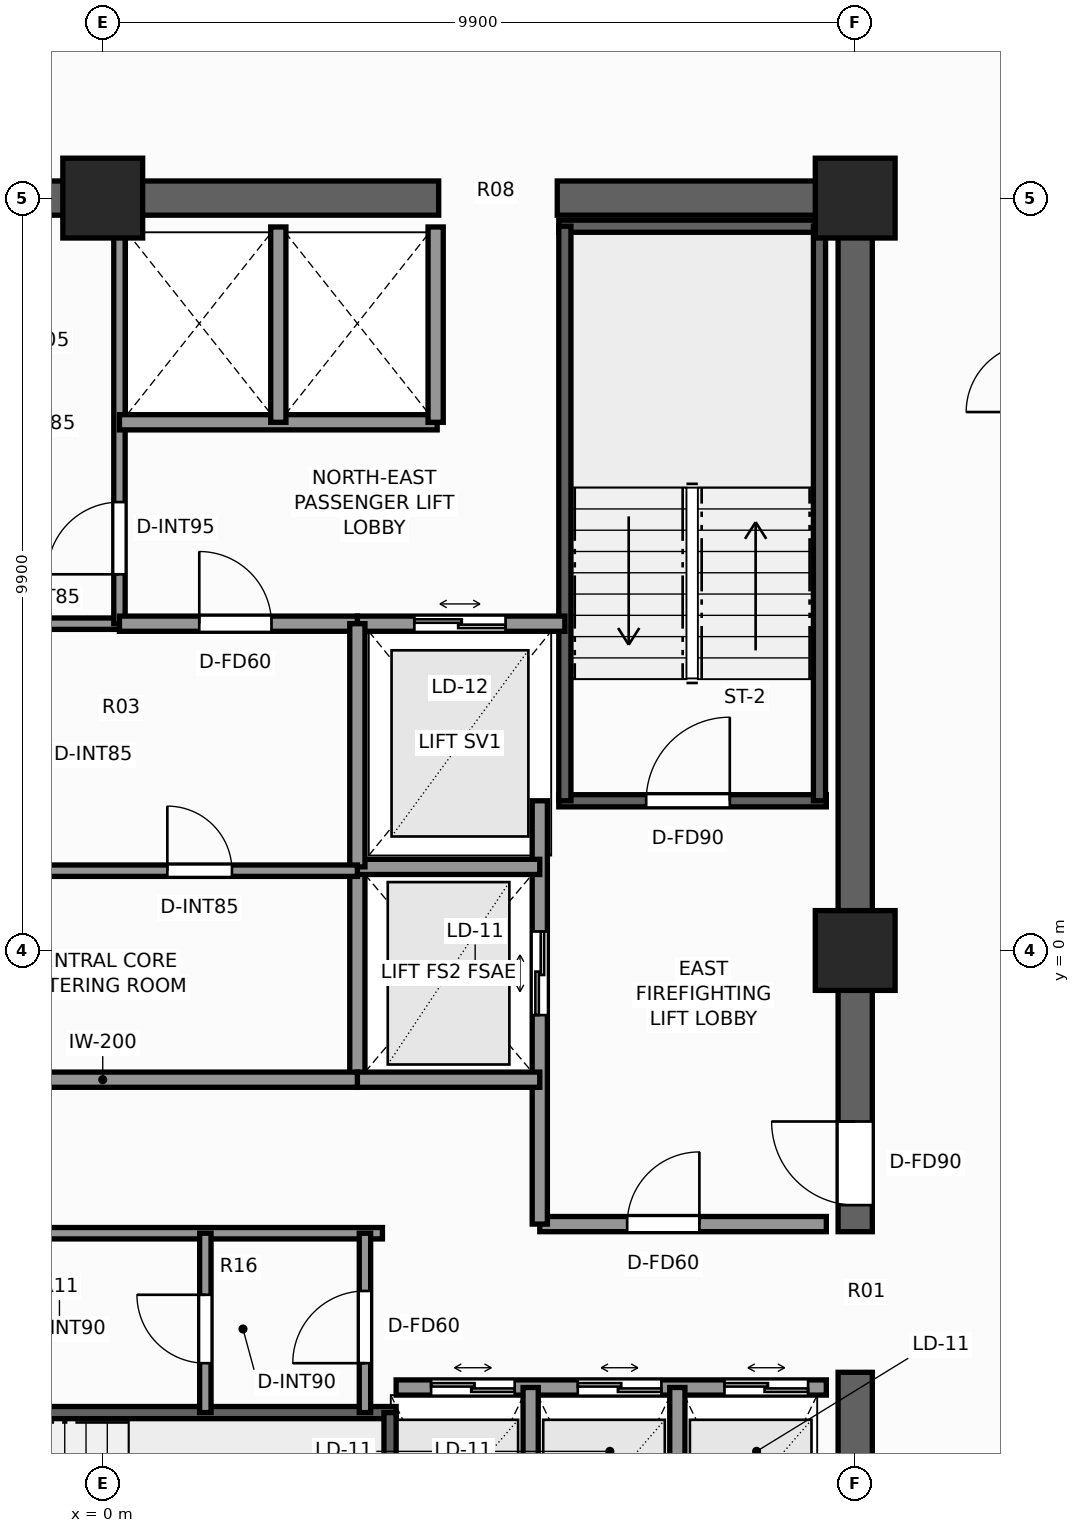
"""IFC4 building model, lengths in metres.
Left out: names, types, materials, properties, quantities, classifications, styles, units other than length and angle.
Written with IfcOpenShell. Run it as: python <this file> out.ifc"""

import sys

from ifc_helpers import new_model, si_unit, direction, frame, frame_2d, origin, origin_2d, place, context, subcontext, project, spatial, rectangle, extrude, element, fill, save


model = new_model("IFC4")
c1 = context("Model", 3, precision=1e-05, world=origin(), true_north=direction((0.0, 1.0)))
c2 = subcontext(c1, "Body", "Model", "MODEL_VIEW")
j1 = project(units=[si_unit("LENGTHUNIT", "METRE"), si_unit("PLANEANGLEUNIT", "RADIAN")], contexts=[c1])
p1 = place(None, origin())
s1 = spatial("IfcSite", under=j1, at=p1, CompositionType="ELEMENT")
p2 = place(p1, origin())
s2 = spatial("IfcBuilding", under=s1, at=p2, CompositionType="ELEMENT")
p3 = place(p2, frame((0.0, 0.0, 222.9)))
s3 = spatial("IfcBuildingStorey", under=s2, at=p3, CompositionType="ELEMENT", Elevation=222.9)
p4 = place(p3, frame((-10.125, 9.9, 0.0), z_axis=(0.0, 0.0, 1.0), x_axis=(1.0, 0.0, 0.0)))
e1 = element("IfcWall", 1, at=p4, inside=s3, PredefinedType="SHEAR", context=c2, shape_type="SweptSolid", body=[
    extrude(rectangle(XDim=14.545, YDim=0.45, at=frame_2d((7.272, 0.0))), origin(), (0.0, 0.0, 1.0), 3.3),
])
p5 = place(p3, frame((5.98, 9.9, 0.0), z_axis=(0.0, 0.0, 1.0), x_axis=(1.0, 0.0, 0.0)))
e2 = element("IfcWall", 2, at=p5, inside=s3, PredefinedType="SHEAR", context=c2, shape_type="SweptSolid", body=[
    extrude(rectangle(XDim=4.145, YDim=0.45, at=frame_2d((2.073, 0.0))), origin(), (0.0, 0.0, 1.0), 3.3),
])
p6 = place(p3, frame((9.9, -9.675, 0.0), z_axis=(0.0, 0.0, 1.0), x_axis=(0.0, 1.0, 0.0)))
e3 = element("IfcWall", 3, at=p6, inside=s3, PredefinedType="SHEAR", context=c2, shape_type="SweptSolid", body=[
    extrude(rectangle(XDim=4.125, YDim=0.45, at=frame_2d((2.062, 0.0))), origin(), (0.0, 0.0, 1.0), 3.3),
])
p7 = place(p3, frame((9.9, -3.7, 0.0), z_axis=(0.0, 0.0, 1.0), x_axis=(0.0, 1.0, 0.0)))
e4 = element("IfcWall", 4, at=p7, inside=s3, PredefinedType="SHEAR", context=c2, shape_type="SweptSolid", body=[
    extrude(rectangle(XDim=13.375, YDim=0.45, at=frame_2d((6.688, 0.0))), origin(), (0.0, 0.0, 1.0), 3.3),
])
p8 = place(p7, frame((0.35, 0.0, 0.0)))
e5 = element("IfcOpeningElement", 5, at=p8, cuts=e4, PredefinedType="OPENING", context=c2, shape_type="SweptSolid", body=[
    extrude(rectangle(XDim=1.1, YDim=2.2, at=frame_2d((0.55, 1.1))), frame((0.0, 0.235, 0.0), z_axis=(0.0, -1.0, 0.0), x_axis=(1.0, 0.0, 0.0)), (0.0, 0.0, 1.0), 0.47),
])
for number, where, z_axis, x_axis in (
    (6, (9.9, 9.9, 0.0), (0.0, 0.0, 1.0), (1.0, 0.0, 0.0)),
    (7, (9.9, 0.0, 0.0), (0.0, 0.0, 1.0), (1.0, 0.0, 0.0)),
    (8, (0.0, 9.9, 0.0), (0.0, 0.0, 1.0), (1.0, 0.0, 0.0)),
):
    element("IfcColumn", number, at=place(p3, frame(where, z_axis=z_axis, x_axis=x_axis)), inside=s3, PredefinedType="COLUMN", context=c2, shape_type="SweptSolid", body=[
        extrude(rectangle(XDim=1.05, YDim=1.05, at=origin_2d()), origin(), (0.0, 0.0, 1.0), 3.3),
    ])
p9 = place(p3, frame((6.0, 1.97, 0.0), z_axis=(0.0, 0.0, 1.0), x_axis=(1.0, 0.0, 0.0)))
e9 = element("IfcWall", 9, at=p9, inside=s3, PredefinedType="SHEAR", context=c2, shape_type="SweptSolid", body=[
    extrude(rectangle(XDim=3.52, YDim=0.16, at=frame_2d((1.76, 0.0))), origin(), (0.0, 0.0, 1.0), 3.3),
])
p10 = place(p9, frame((1.15, 0.0, 0.0)))
e10 = element("IfcOpeningElement", 10, at=p10, cuts=e9, PredefinedType="OPENING", context=c2, shape_type="SweptSolid", body=[
    extrude(rectangle(XDim=1.1, YDim=2.2, at=frame_2d((0.55, 1.1))), frame((0.0, 0.09, 0.0), z_axis=(0.0, -1.0, 0.0), x_axis=(1.0, 0.0, 0.0)), (0.0, 0.0, 1.0), 0.18),
])
p11 = place(p3, frame((6.0, 9.53, 0.0), z_axis=(0.0, 0.0, 1.0), x_axis=(1.0, 0.0, 0.0)))
e11 = element("IfcWall", 11, at=p11, inside=s3, PredefinedType="SHEAR", context=c2, shape_type="SweptSolid", body=[
    extrude(rectangle(XDim=3.52, YDim=0.16, at=frame_2d((1.76, 0.0))), origin(), (0.0, 0.0, 1.0), 3.3),
])
for number, where, z_axis, x_axis in (
    (12, (6.08, 1.97, 0.0), (0.0, 0.0, 1.0), (0.0, 1.0, 0.0)),
    (13, (9.43, 1.97, 0.0), (0.0, 0.0, 1.0), (0.0, 1.0, 0.0)),
):
    element("IfcWall", number, at=place(p3, frame(where, z_axis=z_axis, x_axis=x_axis)), inside=s3, PredefinedType="SHEAR", context=c2, shape_type="SweptSolid", body=[
        extrude(rectangle(XDim=7.56, YDim=0.16, at=frame_2d((3.78, 0.0))), origin(), (0.0, 0.0, 1.0), 3.3),
    ])
p12 = place(p3, frame((-3.86, -6.08, 0.0), z_axis=(0.0, 0.0, 1.0), x_axis=(1.0, 0.0, 0.0)))
e14 = element("IfcWall", 14, at=p12, inside=s3, PredefinedType="SHEAR", context=c2, shape_type="SweptSolid", body=[
    extrude(rectangle(XDim=7.72, YDim=0.16, at=frame_2d((3.86, 0.0))), origin(), (0.0, 0.0, 1.0), 3.3),
])
p13 = place(p3, frame((3.78, -9.43, 0.0), z_axis=(0.0, 0.0, 1.0), x_axis=(0.0, 1.0, 0.0)))
e15 = element("IfcWall", 15, at=p13, inside=s3, PredefinedType="SHEAR", context=c2, shape_type="SweptSolid", body=[
    extrude(rectangle(XDim=3.35, YDim=0.16, at=frame_2d((1.675, 0.0))), origin(), (0.0, 0.0, 1.0), 3.3),
])
p14 = place(p3, frame((5.75, -3.6, 0.0), z_axis=(0.0, 0.0, 1.0), x_axis=(1.0, 0.0, 0.0)))
e16 = element("IfcWall", 16, at=p14, inside=s3, PredefinedType="SOLIDWALL", context=c2, shape_type="SweptSolid", body=[
    extrude(rectangle(XDim=3.77, YDim=0.2, at=frame_2d((1.885, 0.0))), origin(), (0.0, 0.0, 1.0), 3.08),
])
p15 = place(p14, frame((1.15, 0.0, 0.0)))
e17 = element("IfcOpeningElement", 17, at=p15, cuts=e16, PredefinedType="OPENING", context=c2, shape_type="SweptSolid", body=[
    extrude(rectangle(XDim=0.95, YDim=2.06, at=frame_2d((0.475, 1.03))), frame((0.0, 0.11, 0.0), z_axis=(0.0, -1.0, 0.0), x_axis=(1.0, 0.0, 0.0)), (0.0, 0.0, 1.0), 0.22),
])
p16 = place(p3, frame((5.75, -3.6, 0.0), z_axis=(0.0, 0.0, 1.0), x_axis=(0.0, 1.0, 0.0)))
e18 = element("IfcWall", 18, at=p16, inside=s3, PredefinedType="SOLIDWALL", context=c2, shape_type="SweptSolid", body=[
    extrude(rectangle(XDim=5.57, YDim=0.2, at=frame_2d((2.785, 0.0))), origin(), (0.0, 0.0, 1.0), 3.08),
])
p17 = place(p16, frame((2.75, 0.0, 0.0)))
e19 = element("IfcOpeningElement", 19, at=p17, cuts=e18, PredefinedType="OPENING", context=c2, shape_type="SweptSolid", body=[
    extrude(rectangle(XDim=1.1, YDim=2.2, at=frame_2d((0.55, 1.1))), frame((0.0, 0.11, 0.0), z_axis=(0.0, -1.0, 0.0), x_axis=(1.0, 0.0, 0.0)), (0.0, 0.0, 1.0), 0.22),
])
p18 = place(p3, frame((3.35, -1.7, 0.0), z_axis=(0.0, 0.0, 1.0), x_axis=(0.0, 1.0, 0.0)))
e20 = element("IfcWall", 20, at=p18, inside=s3, PredefinedType="SOLIDWALL", context=c2, shape_type="SweptSolid", body=[
    extrude(rectangle(XDim=2.8, YDim=0.2, at=frame_2d((1.4, 0.0))), origin(), (0.0, 0.0, 1.0), 3.08),
])
for number, where, z_axis, x_axis in (
    (21, (3.35, -1.7, 0.0), (0.0, 0.0, 1.0), (1.0, 0.0, 0.0)),
    (22, (3.35, 1.1, 0.0), (0.0, 0.0, 1.0), (1.0, 0.0, 0.0)),
):
    element("IfcWall", number, at=place(p3, frame(where, z_axis=z_axis, x_axis=x_axis)), inside=s3, PredefinedType="SOLIDWALL", context=c2, shape_type="SweptSolid", body=[
        extrude(rectangle(XDim=2.4, YDim=0.2, at=frame_2d((1.2, 0.0))), origin(), (0.0, 0.0, 1.0), 3.08),
    ])
p19 = place(p3, frame((3.35, 4.3, 0.0), z_axis=(0.0, 0.0, 1.0), x_axis=(1.0, 0.0, 0.0)))
e23 = element("IfcWall", 23, at=p19, inside=s3, PredefinedType="SOLIDWALL", context=c2, shape_type="SweptSolid", body=[
    extrude(rectangle(XDim=2.73, YDim=0.2, at=frame_2d((1.365, 0.0))), origin(), (0.0, 0.0, 1.0), 3.08),
])
p20 = place(p19, frame((0.75, 0.0, 0.0)))
e24 = element("IfcOpeningElement", 24, at=p20, cuts=e23, PredefinedType="OPENING", context=c2, shape_type="SweptSolid", body=[
    extrude(rectangle(XDim=1.2, YDim=2.25, at=frame_2d((0.6, 1.125))), frame((0.0, 0.11, 0.0), z_axis=(0.0, -1.0, 0.0), x_axis=(1.0, 0.0, 0.0)), (0.0, 0.0, 1.0), 0.22),
])
p21 = place(p3, frame((-6.08, 4.3, 0.0), z_axis=(0.0, 0.0, 1.0), x_axis=(1.0, 0.0, 0.0)))
e25 = element("IfcWall", 25, at=p21, inside=s3, PredefinedType="PARTITIONING", context=c2, shape_type="SweptSolid", body=[
    extrude(rectangle(XDim=6.3, YDim=0.15, at=frame_2d((3.15, 0.0))), origin(), (0.0, 0.0, 1.0), 3.08),
])
p22 = place(p21, frame((1.05, 0.0, 0.0)))
e26 = element("IfcOpeningElement", 26, at=p22, cuts=e25, PredefinedType="OPENING", context=c2, shape_type="SweptSolid", body=[
    extrude(rectangle(XDim=0.85, YDim=2.03, at=frame_2d((0.425, 1.015))), frame((0.0, 0.085, 0.0), z_axis=(0.0, -1.0, 0.0), x_axis=(1.0, 0.0, 0.0)), (0.0, 0.0, 1.0), 0.17),
])
p23 = place(p3, frame((0.22, 4.3, 0.0), z_axis=(0.0, 0.0, 1.0), x_axis=(0.0, 1.0, 0.0)))
e27 = element("IfcWall", 27, at=p23, inside=s3, PredefinedType="PARTITIONING", context=c2, shape_type="SweptSolid", body=[
    extrude(rectangle(XDim=5.22, YDim=0.15, at=frame_2d((2.61, 0.0))), origin(), (0.0, 0.0, 1.0), 3.08),
])
p24 = place(p23, frame((0.65, 0.0, 0.0)))
e28 = element("IfcOpeningElement", 28, at=p24, cuts=e27, PredefinedType="OPENING", context=c2, shape_type="SweptSolid", body=[
    extrude(rectangle(XDim=0.95, YDim=2.06, at=frame_2d((0.475, 1.03))), frame((0.0, 0.085, 0.0), z_axis=(0.0, -1.0, 0.0), x_axis=(1.0, 0.0, 0.0)), (0.0, 0.0, 1.0), 0.17),
])
p25 = place(p3, frame((0.22, 6.95, 0.0), z_axis=(0.0, 0.0, 1.0), x_axis=(1.0, 0.0, 0.0)))
e29 = element("IfcWall", 29, at=p25, inside=s3, PredefinedType="SOLIDWALL", context=c2, shape_type="SweptSolid", body=[
    extrude(rectangle(XDim=4.18, YDim=0.2, at=frame_2d((2.09, 0.0))), origin(), (0.0, 0.0, 1.0), 3.08),
])
for number, where, z_axis, x_axis in (
    (30, (4.38, 6.95, 0.0), (0.0, 0.0, 1.0), (0.0, 1.0, 0.0)),
    (31, (2.31, 6.95, 0.0), (0.0, 0.0, 1.0), (0.0, 1.0, 0.0)),
):
    element("IfcWall", number, at=place(p3, frame(where, z_axis=z_axis, x_axis=x_axis)), inside=s3, PredefinedType="SOLIDWALL", context=c2, shape_type="SweptSolid", body=[
        extrude(rectangle(XDim=2.57, YDim=0.2, at=frame_2d((1.285, 0.0))), origin(), (0.0, 0.0, 1.0), 3.08),
    ])
p26 = place(p3, frame((3.86, -5.75, 0.0), z_axis=(0.0, 0.0, 1.0), x_axis=(1.0, 0.0, 0.0)))
e32 = element("IfcWall", 32, at=p26, inside=s3, PredefinedType="SOLIDWALL", context=c2, shape_type="SweptSolid", body=[
    extrude(rectangle(XDim=5.66, YDim=0.2, at=frame_2d((2.83, 0.0))), origin(), (0.0, 0.0, 1.0), 3.08),
])
p27 = place(p26, frame((0.46, 0.0, 0.0)))
e33 = element("IfcOpeningElement", 33, at=p27, cuts=e32, PredefinedType="OPENING", context=c2, shape_type="SweptSolid", body=[
    extrude(rectangle(XDim=1.1, YDim=2.2, at=frame_2d((0.55, 1.1))), frame((0.0, 0.11, 0.0), z_axis=(0.0, -1.0, 0.0), x_axis=(1.0, 0.0, 0.0)), (0.0, 0.0, 1.0), 0.22),
])
p28 = place(p26, frame((2.39, 0.0, 0.0)))
e34 = element("IfcOpeningElement", 34, at=p28, cuts=e32, PredefinedType="OPENING", context=c2, shape_type="SweptSolid", body=[
    extrude(rectangle(XDim=1.1, YDim=2.2, at=frame_2d((0.55, 1.1))), frame((0.0, 0.11, 0.0), z_axis=(0.0, -1.0, 0.0), x_axis=(1.0, 0.0, 0.0)), (0.0, 0.0, 1.0), 0.22),
])
p29 = place(p26, frame((4.32, 0.0, 0.0)))
e35 = element("IfcOpeningElement", 35, at=p29, cuts=e32, PredefinedType="OPENING", context=c2, shape_type="SweptSolid", body=[
    extrude(rectangle(XDim=1.1, YDim=2.2, at=frame_2d((0.55, 1.1))), frame((0.0, 0.11, 0.0), z_axis=(0.0, -1.0, 0.0), x_axis=(1.0, 0.0, 0.0)), (0.0, 0.0, 1.0), 0.22),
])
for number, where, z_axis, x_axis in (
    (36, (5.63, -9.52, 0.0), (0.0, 0.0, 1.0), (0.0, 1.0, 0.0)),
    (37, (7.56, -9.52, 0.0), (0.0, 0.0, 1.0), (0.0, 1.0, 0.0)),
):
    element("IfcWall", number, at=place(p3, frame(where, z_axis=z_axis, x_axis=x_axis)), inside=s3, PredefinedType="SOLIDWALL", context=c2, shape_type="SweptSolid", body=[
        extrude(rectangle(XDim=3.77, YDim=0.2, at=frame_2d((1.885, 0.0))), origin(), (0.0, 0.0, 1.0), 3.08),
    ])
p30 = place(p3, frame((0.22, 4.3, 0.0), z_axis=(0.0, 0.0, 1.0), x_axis=(1.0, 0.0, 0.0)))
e38 = element("IfcWall", 38, at=p30, inside=s3, PredefinedType="SOLIDWALL", context=c2, shape_type="SweptSolid", body=[
    extrude(rectangle(XDim=3.13, YDim=0.2, at=frame_2d((1.565, 0.0))), origin(), (0.0, 0.0, 1.0), 3.08),
])
p31 = place(p30, frame((1.05, 0.0, 0.0)))
e39 = element("IfcOpeningElement", 39, at=p31, cuts=e38, PredefinedType="OPENING", context=c2, shape_type="SweptSolid", body=[
    extrude(rectangle(XDim=0.95, YDim=2.06, at=frame_2d((0.475, 1.03))), frame((0.0, 0.11, 0.0), z_axis=(0.0, -1.0, 0.0), x_axis=(1.0, 0.0, 0.0)), (0.0, 0.0, 1.0), 0.22),
])
p32 = place(p3, frame((-3.35, -1.7, 0.0), z_axis=(0.0, 0.0, 1.0), x_axis=(1.0, 0.0, 0.0)))
e40 = element("IfcWall", 40, at=p32, inside=s3, PredefinedType="SOLIDWALL", context=c2, shape_type="SweptSolid", body=[
    extrude(rectangle(XDim=6.7, YDim=0.2, at=frame_2d((3.35, 0.0))), origin(), (0.0, 0.0, 1.0), 3.08),
])
p33 = place(p3, frame((3.35, 1.1, 0.0), z_axis=(0.0, 0.0, 1.0), x_axis=(0.0, 1.0, 0.0)))
e41 = element("IfcWall", 41, at=p33, inside=s3, PredefinedType="SOLIDWALL", context=c2, shape_type="SweptSolid", body=[
    extrude(rectangle(XDim=3.2, YDim=0.2, at=frame_2d((1.6, 0.0))), origin(), (0.0, 0.0, 1.0), 3.08),
])
p34 = place(p3, frame((-3.35, 1.05, 0.0), z_axis=(0.0, 0.0, 1.0), x_axis=(1.0, 0.0, 0.0)))
e42 = element("IfcWall", 42, at=p34, inside=s3, PredefinedType="PARTITIONING", context=c2, shape_type="SweptSolid", body=[
    extrude(rectangle(XDim=6.7, YDim=0.15, at=frame_2d((3.35, 0.0))), origin(), (0.0, 0.0, 1.0), 3.08),
])
p35 = place(p34, frame((4.2, 0.0, 0.0)))
e43 = element("IfcOpeningElement", 43, at=p35, cuts=e42, PredefinedType="OPENING", context=c2, shape_type="SweptSolid", body=[
    extrude(rectangle(XDim=0.85, YDim=2.03, at=frame_2d((0.425, 1.015))), frame((0.0, 0.085, 0.0), z_axis=(0.0, -1.0, 0.0), x_axis=(1.0, 0.0, 0.0)), (0.0, 0.0, 1.0), 0.17),
])
p36 = place(p3, frame((-3.68, -3.72, 0.0), z_axis=(0.0, 0.0, 1.0), x_axis=(1.0, 0.0, 0.0)))
e44 = element("IfcWall", 44, at=p36, inside=s3, PredefinedType="PARTITIONING", context=c2, shape_type="SweptSolid", body=[
    extrude(rectangle(XDim=7.36, YDim=0.15, at=frame_2d((3.68, 0.0))), origin(), (0.0, 0.0, 1.0), 3.08),
])
p37 = place(p3, frame((3.45, -6.08, 0.0), z_axis=(0.0, 0.0, 1.0), x_axis=(0.0, 1.0, 0.0)))
e45 = element("IfcWall", 45, at=p37, inside=s3, PredefinedType="PARTITIONING", context=c2, shape_type="SweptSolid", body=[
    extrude(rectangle(XDim=2.36, YDim=0.15, at=frame_2d((1.18, 0.0))), origin(), (0.0, 0.0, 1.0), 3.08),
])
p38 = place(p37, frame((0.65, 0.0, 0.0)))
e46 = element("IfcOpeningElement", 46, at=p38, cuts=e45, PredefinedType="OPENING", context=c2, shape_type="SweptSolid", body=[
    extrude(rectangle(XDim=0.95, YDim=2.06, at=frame_2d((0.475, 1.03))), frame((0.0, 0.085, 0.0), z_axis=(0.0, -1.0, 0.0), x_axis=(1.0, 0.0, 0.0)), (0.0, 0.0, 1.0), 0.17),
])
p39 = place(p3, frame((1.35, -6.08, 0.0), z_axis=(0.0, 0.0, 1.0), x_axis=(0.0, 1.0, 0.0)))
e47 = element("IfcWall", 47, at=p39, inside=s3, PredefinedType="PARTITIONING", context=c2, shape_type="SweptSolid", body=[
    extrude(rectangle(XDim=2.36, YDim=0.15, at=frame_2d((1.18, 0.0))), origin(), (0.0, 0.0, 1.0), 3.08),
])
p40 = place(p39, frame((0.65, 0.0, 0.0)))
e48 = element("IfcOpeningElement", 48, at=p40, cuts=e47, PredefinedType="OPENING", context=c2, shape_type="SweptSolid", body=[
    extrude(rectangle(XDim=0.9, YDim=2.06, at=frame_2d((0.45, 1.03))), frame((0.0, 0.085, 0.0), z_axis=(0.0, -1.0, 0.0), x_axis=(1.0, 0.0, 0.0)), (0.0, 0.0, 1.0), 0.17),
])
p41 = place(p10, origin())
e49 = element("IfcDoor", 49, at=p41, inside=s3, OperationType="SINGLE_SWING_RIGHT", PredefinedType="DOOR", context=c2, shape_type="SweptSolid", body=[
    extrude(rectangle(XDim=1.1, YDim=2.2, at=frame_2d((0.55, 1.1))), frame((0.0, 0.025, 0.0), z_axis=(0.0, -1.0, 0.0), x_axis=(1.0, 0.0, 0.0)), (0.0, 0.0, 1.0), 0.05),
])
fill(e10, e49)
p42 = place(p8, origin())
e50 = element("IfcDoor", 50, at=p42, inside=s3, OperationType="SINGLE_SWING_RIGHT", PredefinedType="DOOR", context=c2, shape_type="SweptSolid", body=[
    extrude(rectangle(XDim=1.1, YDim=2.2, at=frame_2d((0.55, 1.1))), frame((0.0, 0.025, 0.0), z_axis=(0.0, -1.0, 0.0), x_axis=(1.0, 0.0, 0.0)), (0.0, 0.0, 1.0), 0.05),
])
fill(e5, e50)
p43 = place(p17, origin())
e51 = element("IfcDoor", 51, at=p43, inside=s3, OperationType="DOUBLE_DOOR_SLIDING", PredefinedType="DOOR", context=c2, shape_type="SweptSolid", body=[
    extrude(rectangle(XDim=1.1, YDim=2.2, at=frame_2d((0.55, 1.1))), frame((0.0, 0.025, 0.0), z_axis=(0.0, -1.0, 0.0), x_axis=(1.0, 0.0, 0.0)), (0.0, 0.0, 1.0), 0.05),
])
fill(e19, e51)
p44 = place(p20, origin())
e52 = element("IfcDoor", 52, at=p44, inside=s3, OperationType="DOUBLE_DOOR_SLIDING", PredefinedType="DOOR", context=c2, shape_type="SweptSolid", body=[
    extrude(rectangle(XDim=1.2, YDim=2.25, at=frame_2d((0.6, 1.125))), frame((0.0, 0.025, 0.0), z_axis=(0.0, -1.0, 0.0), x_axis=(1.0, 0.0, 0.0)), (0.0, 0.0, 1.0), 0.05),
])
fill(e24, e52)
p45 = place(p24, origin())
e53 = element("IfcDoor", 53, at=p45, inside=s3, OperationType="SINGLE_SWING_LEFT", PredefinedType="DOOR", context=c2, shape_type="SweptSolid", body=[
    extrude(rectangle(XDim=0.95, YDim=2.06, at=frame_2d((0.475, 1.03))), frame((0.0, 0.025, 0.0), z_axis=(0.0, -1.0, 0.0), x_axis=(1.0, 0.0, 0.0)), (0.0, 0.0, 1.0), 0.05),
])
fill(e28, e53)
p46 = place(p27, origin())
e54 = element("IfcDoor", 54, at=p46, inside=s3, OperationType="DOUBLE_DOOR_SLIDING", PredefinedType="DOOR", context=c2, shape_type="SweptSolid", body=[
    extrude(rectangle(XDim=1.1, YDim=2.2, at=frame_2d((0.55, 1.1))), frame((0.0, 0.025, 0.0), z_axis=(0.0, -1.0, 0.0), x_axis=(1.0, 0.0, 0.0)), (0.0, 0.0, 1.0), 0.05),
])
fill(e33, e54)
p47 = place(p28, origin())
e55 = element("IfcDoor", 55, at=p47, inside=s3, OperationType="DOUBLE_DOOR_SLIDING", PredefinedType="DOOR", context=c2, shape_type="SweptSolid", body=[
    extrude(rectangle(XDim=1.1, YDim=2.2, at=frame_2d((0.55, 1.1))), frame((0.0, 0.025, 0.0), z_axis=(0.0, -1.0, 0.0), x_axis=(1.0, 0.0, 0.0)), (0.0, 0.0, 1.0), 0.05),
])
fill(e34, e55)
p48 = place(p29, origin())
e56 = element("IfcDoor", 56, at=p48, inside=s3, OperationType="DOUBLE_DOOR_SLIDING", PredefinedType="DOOR", context=c2, shape_type="SweptSolid", body=[
    extrude(rectangle(XDim=1.1, YDim=2.2, at=frame_2d((0.55, 1.1))), frame((0.0, 0.025, 0.0), z_axis=(0.0, -1.0, 0.0), x_axis=(1.0, 0.0, 0.0)), (0.0, 0.0, 1.0), 0.05),
])
fill(e35, e56)
p49 = place(p15, origin())
e57 = element("IfcDoor", 57, at=p49, inside=s3, OperationType="SINGLE_SWING_RIGHT", PredefinedType="DOOR", context=c2, shape_type="SweptSolid", body=[
    extrude(rectangle(XDim=0.95, YDim=2.06, at=frame_2d((0.475, 1.03))), frame((0.0, 0.025, 0.0), z_axis=(0.0, -1.0, 0.0), x_axis=(1.0, 0.0, 0.0)), (0.0, 0.0, 1.0), 0.05),
])
fill(e17, e57)
p50 = place(p31, origin())
e58 = element("IfcDoor", 58, at=p50, inside=s3, OperationType="SINGLE_SWING_LEFT", PredefinedType="DOOR", context=c2, shape_type="SweptSolid", body=[
    extrude(rectangle(XDim=0.95, YDim=2.06, at=frame_2d((0.475, 1.03))), frame((0.0, 0.025, 0.0), z_axis=(0.0, -1.0, 0.0), x_axis=(1.0, 0.0, 0.0)), (0.0, 0.0, 1.0), 0.05),
])
fill(e39, e58)
p51 = place(p35, origin())
e59 = element("IfcDoor", 59, at=p51, inside=s3, OperationType="SINGLE_SWING_LEFT", PredefinedType="DOOR", context=c2, shape_type="SweptSolid", body=[
    extrude(rectangle(XDim=0.85, YDim=2.03, at=frame_2d((0.425, 1.015))), frame((0.0, 0.025, 0.0), z_axis=(0.0, -1.0, 0.0), x_axis=(1.0, 0.0, 0.0)), (0.0, 0.0, 1.0), 0.05),
])
fill(e43, e59)
p52 = place(p38, origin())
e60 = element("IfcDoor", 60, at=p52, inside=s3, OperationType="SINGLE_SWING_LEFT", PredefinedType="DOOR", context=c2, shape_type="SweptSolid", body=[
    extrude(rectangle(XDim=0.95, YDim=2.06, at=frame_2d((0.475, 1.03))), frame((0.0, 0.025, 0.0), z_axis=(0.0, -1.0, 0.0), x_axis=(1.0, 0.0, 0.0)), (0.0, 0.0, 1.0), 0.05),
])
fill(e46, e60)
p53 = place(p40, origin())
e61 = element("IfcDoor", 61, at=p53, inside=s3, OperationType="SINGLE_SWING_RIGHT", PredefinedType="DOOR", context=c2, shape_type="SweptSolid", body=[
    extrude(rectangle(XDim=0.9, YDim=2.06, at=frame_2d((0.45, 1.03))), frame((0.0, 0.025, 0.0), z_axis=(0.0, -1.0, 0.0), x_axis=(1.0, 0.0, 0.0)), (0.0, 0.0, 1.0), 0.05),
])
fill(e48, e61)
save(model, sys.argv[1])
